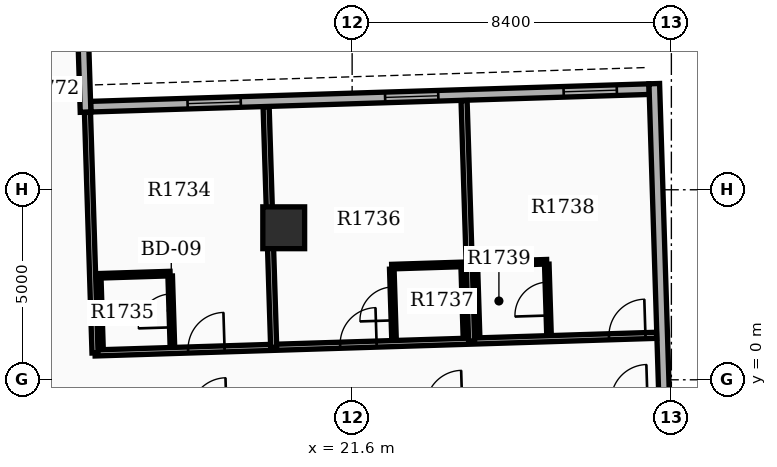
"""IFC4 building model, lengths in metres.
Left out: names, types, materials, properties, quantities, classifications, styles, units other than length and angle.
Written with IfcOpenShell. Run it as: python <this file> out.ifc"""

import sys

from ifc_helpers import new_model, si_unit, direction, frame, frame_2d, origin, origin_2d, place, context, subcontext, project, spatial, rectangle, extrude, element, fill, save


model = new_model("IFC4")
c1 = context("Model", 3, precision=1e-05, world=origin(), true_north=direction((0.0, 1.0)))
c2 = subcontext(c1, "Body", "Model", "MODEL_VIEW")
j1 = project(units=[si_unit("LENGTHUNIT", "METRE"), si_unit("PLANEANGLEUNIT", "RADIAN")], contexts=[c1])
p1 = place(None, origin())
s1 = spatial("IfcSite", under=j1, at=p1, CompositionType="ELEMENT")
p2 = place(p1, origin())
s2 = spatial("IfcBuilding", under=s1, at=p2, CompositionType="ELEMENT")
p3 = place(p2, frame((0.0, 0.0, 112.5)))
s3 = spatial("IfcBuildingStorey", under=s2, at=p3, CompositionType="ELEMENT", Elevation=112.5)
p4 = place(p3, frame((19.8, 4.0, 0.0), z_axis=(0.0, 0.0, 1.0), x_axis=(1.0, 0.0, 0.0)))
e1 = element("IfcColumn", 1, at=p4, inside=s3, PredefinedType="COLUMN", context=c2, shape_type="SweptSolid", body=[
    extrude(rectangle(XDim=1.1, YDim=1.1, at=origin_2d()), origin(), (0.0, 0.0, 1.0), 3.9),
])
p5 = place(p3, frame((29.414, 7.648, 0.0), z_axis=(0.0, 0.0, 1.0), x_axis=(-0.999506714454, -0.031405855522, 0.0)))
e2 = element("IfcWall", 2, at=p5, inside=s3, PredefinedType="STANDARD", context=c2, shape_type="SweptSolid", body=[
    extrude(rectangle(XDim=14.7, YDim=0.28, at=frame_2d((7.35, 0.0))), origin(), (0.0, 0.0, 1.0), 2.97),
])
p6 = place(p5, frame((0.85, 0.0, 0.8)))
e3 = element("IfcOpeningElement", 3, at=p6, cuts=e2, PredefinedType="OPENING", context=c2, shape_type="SweptSolid", body=[
    extrude(rectangle(XDim=1.4, YDim=1.6, at=frame_2d((0.7, 0.8))), frame((0.0, 0.15, 0.0), z_axis=(0.0, -1.0, 0.0), x_axis=(1.0, 0.0, 0.0)), (0.0, 0.0, 1.0), 0.3),
])
p7 = place(p5, frame((5.55, 0.0, 0.8)))
e4 = element("IfcOpeningElement", 4, at=p7, cuts=e2, PredefinedType="OPENING", context=c2, shape_type="SweptSolid", body=[
    extrude(rectangle(XDim=1.4, YDim=1.6, at=frame_2d((0.7, 0.8))), frame((0.0, 0.15, 0.0), z_axis=(0.0, -1.0, 0.0), x_axis=(1.0, 0.0, 0.0)), (0.0, 0.0, 1.0), 0.3),
])
p8 = place(p5, frame((10.75, 0.0, 0.8)))
e5 = element("IfcOpeningElement", 5, at=p8, cuts=e2, PredefinedType="OPENING", context=c2, shape_type="SweptSolid", body=[
    extrude(rectangle(XDim=1.4, YDim=1.6, at=frame_2d((0.7, 0.8))), frame((0.0, 0.15, 0.0), z_axis=(0.0, -1.0, 0.0), x_axis=(1.0, 0.0, 0.0)), (0.0, 0.0, 1.0), 0.3),
])
p9 = place(p3, frame((29.981, -5.921, 0.0), z_axis=(0.0, 0.0, 1.0), x_axis=(-0.031407524763, 0.999506662003, 0.0)))
e6 = element("IfcWall", 6, at=p9, inside=s3, PredefinedType="STANDARD", context=c2, shape_type="SweptSolid", body=[
    extrude(rectangle(XDim=13.72, YDim=0.28, at=frame_2d((6.86, 0.0))), origin(), (0.0, 0.0, 1.0), 2.97),
])
p10 = place(p9, frame((0.85, 0.0, 0.85)))
e7 = element("IfcOpeningElement", 7, at=p10, cuts=e6, PredefinedType="OPENING", context=c2, shape_type="SweptSolid", body=[
    extrude(rectangle(XDim=1.0, YDim=1.5, at=frame_2d((0.5, 0.75))), frame((0.0, 0.15, 0.0), z_axis=(0.0, -1.0, 0.0), x_axis=(1.0, 0.0, 0.0)), (0.0, 0.0, 1.0), 0.3),
])
p11 = place(p3, frame((14.586, 7.042, 0.0), z_axis=(0.0, 0.0, 1.0), x_axis=(-0.031389189386, 0.999507237988, 0.0)))
e8 = element("IfcWall", 8, at=p11, inside=s3, PredefinedType="STANDARD", context=c2, shape_type="SweptSolid", body=[
    extrude(rectangle(XDim=6.86, YDim=0.28, at=frame_2d((3.43, 0.0))), origin(), (0.0, 0.0, 1.0), 2.97),
])
p12 = place(p3, frame((14.835, 0.706, 0.0), z_axis=(0.0, 0.0, 1.0), x_axis=(0.999506468759, 0.031413673903, 0.0)))
e9 = element("IfcWall", 9, at=p12, inside=s3, PredefinedType="PARTITIONING", context=c2, shape_type="SweptSolid", body=[
    extrude(rectangle(XDim=14.782, YDim=0.16, at=frame_2d((7.391, 0.0))), origin(), (0.0, 0.0, 1.0), 2.96),
])
p13 = place(p12, frame((2.45, 0.0, 0.0)))
e10 = element("IfcOpeningElement", 10, at=p13, cuts=e9, PredefinedType="OPENING", context=c2, shape_type="SweptSolid", body=[
    extrude(rectangle(XDim=0.96, YDim=2.15, at=frame_2d((0.48, 1.075))), frame((0.0, 0.09, 0.0), z_axis=(0.0, -1.0, 0.0), x_axis=(1.0, 0.0, 0.0)), (0.0, 0.0, 1.0), 0.18),
])
p14 = place(p12, frame((6.453, 0.0, 0.0)))
e11 = element("IfcOpeningElement", 11, at=p14, cuts=e9, PredefinedType="OPENING", context=c2, shape_type="SweptSolid", body=[
    extrude(rectangle(XDim=0.96, YDim=2.15, at=frame_2d((0.48, 1.075))), frame((0.0, 0.09, 0.0), z_axis=(0.0, -1.0, 0.0), x_axis=(1.0, 0.0, 0.0)), (0.0, 0.0, 1.0), 0.18),
])
p15 = place(p12, frame((13.53, 0.0, 0.0)))
e12 = element("IfcOpeningElement", 12, at=p15, cuts=e9, PredefinedType="OPENING", context=c2, shape_type="SweptSolid", body=[
    extrude(rectangle(XDim=0.96, YDim=2.15, at=frame_2d((0.48, 1.075))), frame((0.0, 0.09, 0.0), z_axis=(0.0, -1.0, 0.0), x_axis=(1.0, 0.0, 0.0)), (0.0, 0.0, 1.0), 0.18),
])
p16 = place(p3, frame((14.835, 0.706, 0.0), z_axis=(0.0, 0.0, 1.0), x_axis=(-0.031423736229, 0.999506152458, 0.0)))
e13 = element("IfcWall", 13, at=p16, inside=s3, PredefinedType="PARTITIONING", context=c2, shape_type="SweptSolid", body=[
    extrude(rectangle(XDim=6.332, YDim=0.16, at=frame_2d((3.166, 0.0))), origin(), (0.0, 0.0, 1.0), 2.96),
])
p17 = place(p3, frame((19.536, 0.854, 0.0), z_axis=(0.0, 0.0, 1.0), x_axis=(-0.031422525277, 0.999506190529, 0.0)))
e14 = element("IfcWall", 14, at=p17, inside=s3, PredefinedType="PARTITIONING", context=c2, shape_type="SweptSolid", body=[
    extrude(rectangle(XDim=6.332, YDim=0.16, at=frame_2d((3.166, 0.0))), origin(), (0.0, 0.0, 1.0), 2.96),
])
p18 = place(p3, frame((16.87, 0.91, 0.0), z_axis=(0.0, 0.0, 1.0), x_axis=(-0.031389704724, 0.999507221803, 0.0)))
e15 = element("IfcWall", 15, at=p18, inside=s3, PredefinedType="PARTITIONING", context=c2, shape_type="SweptSolid", body=[
    extrude(rectangle(XDim=1.82, YDim=0.12, at=frame_2d((0.91, 0.0))), origin(), (0.0, 0.0, 1.0), 2.96),
])
p19 = place(p18, frame((0.47, 0.0, 0.0)))
e16 = element("IfcOpeningElement", 16, at=p19, cuts=e15, PredefinedType="OPENING", context=c2, shape_type="SweptSolid", body=[
    extrude(rectangle(XDim=0.88, YDim=2.1, at=frame_2d((0.44, 1.05))), frame((0.0, 0.07, 0.0), z_axis=(0.0, -1.0, 0.0), x_axis=(1.0, 0.0, 0.0)), (0.0, 0.0, 1.0), 0.14),
])
p20 = place(p3, frame((14.991, 0.851, 0.0), z_axis=(0.0, 0.0, 1.0), x_axis=(-0.031389704724, 0.999507221803, 0.0)))
e17 = element("IfcWall", 17, at=p20, inside=s3, PredefinedType="PARTITIONING", context=c2, shape_type="SweptSolid", body=[
    extrude(rectangle(XDim=1.82, YDim=0.12, at=frame_2d((0.91, 0.0))), origin(), (0.0, 0.0, 1.0), 2.96),
])
p21 = place(p3, frame((14.931, 2.735, 0.0), z_axis=(0.0, 0.0, 1.0), x_axis=(0.999506103526, 0.031425292588, 0.0)))
e18 = element("IfcWall", 18, at=p21, inside=s3, PredefinedType="PARTITIONING", context=c2, shape_type="SweptSolid", body=[
    extrude(rectangle(XDim=1.88, YDim=0.12, at=frame_2d((0.94, 0.0))), origin(), (0.0, 0.0, 1.0), 2.96),
])
p22 = place(p3, frame((24.744, 1.018, 0.0), z_axis=(0.0, 0.0, 1.0), x_axis=(-0.03138400803, 0.999507400693, 0.0)))
e19 = element("IfcWall", 19, at=p22, inside=s3, PredefinedType="PARTITIONING", context=c2, shape_type="SweptSolid", body=[
    extrude(rectangle(XDim=6.332, YDim=0.16, at=frame_2d((3.166, 0.0))), origin(), (0.0, 0.0, 1.0), 2.96),
])
p23 = place(p3, frame((22.701, 1.094, 0.0), z_axis=(0.0, 0.0, 1.0), x_axis=(-0.031389704724, 0.999507221803, 0.0)))
e20 = element("IfcWall", 20, at=p23, inside=s3, PredefinedType="PARTITIONING", context=c2, shape_type="SweptSolid", body=[
    extrude(rectangle(XDim=1.82, YDim=0.12, at=frame_2d((0.91, 0.0))), origin(), (0.0, 0.0, 1.0), 2.96),
])
p24 = place(p23, frame((0.47, 0.0, 0.0)))
e21 = element("IfcOpeningElement", 21, at=p24, cuts=e20, PredefinedType="OPENING", context=c2, shape_type="SweptSolid", body=[
    extrude(rectangle(XDim=0.88, YDim=2.1, at=frame_2d((0.44, 1.05))), frame((0.0, 0.07, 0.0), z_axis=(0.0, -1.0, 0.0), x_axis=(1.0, 0.0, 0.0)), (0.0, 0.0, 1.0), 0.14),
])
p25 = place(p3, frame((24.58, 1.153, 0.0), z_axis=(0.0, 0.0, 1.0), x_axis=(-0.031389704724, 0.999507221803, 0.0)))
e22 = element("IfcWall", 22, at=p25, inside=s3, PredefinedType="PARTITIONING", context=c2, shape_type="SweptSolid", body=[
    extrude(rectangle(XDim=1.82, YDim=0.12, at=frame_2d((0.91, 0.0))), origin(), (0.0, 0.0, 1.0), 2.96),
])
p26 = place(p3, frame((22.642, 2.978, 0.0), z_axis=(0.0, 0.0, 1.0), x_axis=(0.999510173889, 0.031295563454, 0.0)))
e23 = element("IfcWall", 23, at=p26, inside=s3, PredefinedType="PARTITIONING", context=c2, shape_type="SweptSolid", body=[
    extrude(rectangle(XDim=1.88, YDim=0.12, at=frame_2d((0.94, 0.0))), origin(), (0.0, 0.0, 1.0), 2.96),
])
p27 = place(p3, frame((26.779, 1.222, 0.0), z_axis=(0.0, 0.0, 1.0), x_axis=(-0.031389704724, 0.999507221803, 0.0)))
e24 = element("IfcWall", 24, at=p27, inside=s3, PredefinedType="PARTITIONING", context=c2, shape_type="SweptSolid", body=[
    extrude(rectangle(XDim=1.82, YDim=0.12, at=frame_2d((0.91, 0.0))), origin(), (0.0, 0.0, 1.0), 2.96),
])
p28 = place(p27, frame((0.47, 0.0, 0.0)))
e25 = element("IfcOpeningElement", 25, at=p28, cuts=e24, PredefinedType="OPENING", context=c2, shape_type="SweptSolid", body=[
    extrude(rectangle(XDim=0.88, YDim=2.1, at=frame_2d((0.44, 1.05))), frame((0.0, 0.07, 0.0), z_axis=(0.0, -1.0, 0.0), x_axis=(1.0, 0.0, 0.0)), (0.0, 0.0, 1.0), 0.14),
])
p29 = place(p3, frame((24.9, 1.163, 0.0), z_axis=(0.0, 0.0, 1.0), x_axis=(-0.03152371574, 0.999503004171, 0.0)))
e26 = element("IfcWall", 26, at=p29, inside=s3, PredefinedType="PARTITIONING", context=c2, shape_type="SweptSolid", body=[
    extrude(rectangle(XDim=1.82, YDim=0.12, at=frame_2d((0.91, 0.0))), origin(), (0.0, 0.0, 1.0), 2.96),
])
p30 = place(p3, frame((24.841, 3.047, 0.0), z_axis=(0.0, 0.0, 1.0), x_axis=(0.999510046681, 0.031299625942, 0.0)))
e27 = element("IfcWall", 27, at=p30, inside=s3, PredefinedType="PARTITIONING", context=c2, shape_type="SweptSolid", body=[
    extrude(rectangle(XDim=1.88, YDim=0.12, at=frame_2d((0.94, 0.0))), origin(), (0.0, 0.0, 1.0), 2.96),
])
p31 = place(p6, origin())
e28 = element("IfcWindow", 28, at=p31, inside=s3, PartitioningType="SINGLE_PANEL", PredefinedType="WINDOW", context=c2, shape_type="SweptSolid", body=[
    extrude(rectangle(XDim=1.4, YDim=1.6, at=frame_2d((0.7, 0.8))), frame((0.0, 0.03, 0.0), z_axis=(0.0, -1.0, 0.0), x_axis=(1.0, 0.0, 0.0)), (0.0, 0.0, 1.0), 0.06),
])
fill(e3, e28)
p32 = place(p7, origin())
e29 = element("IfcWindow", 29, at=p32, inside=s3, PartitioningType="SINGLE_PANEL", PredefinedType="WINDOW", context=c2, shape_type="SweptSolid", body=[
    extrude(rectangle(XDim=1.4, YDim=1.6, at=frame_2d((0.7, 0.8))), frame((0.0, 0.03, 0.0), z_axis=(0.0, -1.0, 0.0), x_axis=(1.0, 0.0, 0.0)), (0.0, 0.0, 1.0), 0.06),
])
fill(e4, e29)
p33 = place(p8, origin())
e30 = element("IfcWindow", 30, at=p33, inside=s3, PartitioningType="SINGLE_PANEL", PredefinedType="WINDOW", context=c2, shape_type="SweptSolid", body=[
    extrude(rectangle(XDim=1.4, YDim=1.6, at=frame_2d((0.7, 0.8))), frame((0.0, 0.03, 0.0), z_axis=(0.0, -1.0, 0.0), x_axis=(1.0, 0.0, 0.0)), (0.0, 0.0, 1.0), 0.06),
])
fill(e5, e30)
p34 = place(p13, origin())
e31 = element("IfcDoor", 31, at=p34, inside=s3, OperationType="SINGLE_SWING_RIGHT", PredefinedType="DOOR", context=c2, shape_type="SweptSolid", body=[
    extrude(rectangle(XDim=0.96, YDim=2.15, at=frame_2d((0.48, 1.075))), frame((0.0, 0.025, 0.0), z_axis=(0.0, -1.0, 0.0), x_axis=(1.0, 0.0, 0.0)), (0.0, 0.0, 1.0), 0.05),
])
fill(e10, e31)
p35 = place(p19, origin())
e32 = element("IfcDoor", 32, at=p35, inside=s3, OperationType="SINGLE_SWING_LEFT", PredefinedType="DOOR", context=c2, shape_type="SweptSolid", body=[
    extrude(rectangle(XDim=0.88, YDim=2.1, at=frame_2d((0.44, 1.05))), frame((0.0, 0.025, 0.0), z_axis=(0.0, -1.0, 0.0), x_axis=(1.0, 0.0, 0.0)), (0.0, 0.0, 1.0), 0.05),
])
fill(e16, e32)
p36 = place(p14, origin())
e33 = element("IfcDoor", 33, at=p36, inside=s3, OperationType="SINGLE_SWING_RIGHT", PredefinedType="DOOR", context=c2, shape_type="SweptSolid", body=[
    extrude(rectangle(XDim=0.96, YDim=2.15, at=frame_2d((0.48, 1.075))), frame((0.0, 0.025, 0.0), z_axis=(0.0, -1.0, 0.0), x_axis=(1.0, 0.0, 0.0)), (0.0, 0.0, 1.0), 0.05),
])
fill(e11, e33)
p37 = place(p24, origin())
e34 = element("IfcDoor", 34, at=p37, inside=s3, OperationType="SINGLE_SWING_LEFT", PredefinedType="DOOR", context=c2, shape_type="SweptSolid", body=[
    extrude(rectangle(XDim=0.88, YDim=2.1, at=frame_2d((0.44, 1.05))), frame((0.0, 0.025, 0.0), z_axis=(0.0, -1.0, 0.0), x_axis=(1.0, 0.0, 0.0)), (0.0, 0.0, 1.0), 0.05),
])
fill(e21, e34)
p38 = place(p15, origin())
e35 = element("IfcDoor", 35, at=p38, inside=s3, OperationType="SINGLE_SWING_RIGHT", PredefinedType="DOOR", context=c2, shape_type="SweptSolid", body=[
    extrude(rectangle(XDim=0.96, YDim=2.15, at=frame_2d((0.48, 1.075))), frame((0.0, 0.025, 0.0), z_axis=(0.0, -1.0, 0.0), x_axis=(1.0, 0.0, 0.0)), (0.0, 0.0, 1.0), 0.05),
])
fill(e12, e35)
p39 = place(p28, origin())
e36 = element("IfcDoor", 36, at=p39, inside=s3, OperationType="SINGLE_SWING_LEFT", PredefinedType="DOOR", context=c2, shape_type="SweptSolid", body=[
    extrude(rectangle(XDim=0.88, YDim=2.1, at=frame_2d((0.44, 1.05))), frame((0.0, 0.025, 0.0), z_axis=(0.0, -1.0, 0.0), x_axis=(1.0, 0.0, 0.0)), (0.0, 0.0, 1.0), 0.05),
])
fill(e25, e36)
save(model, sys.argv[1])
